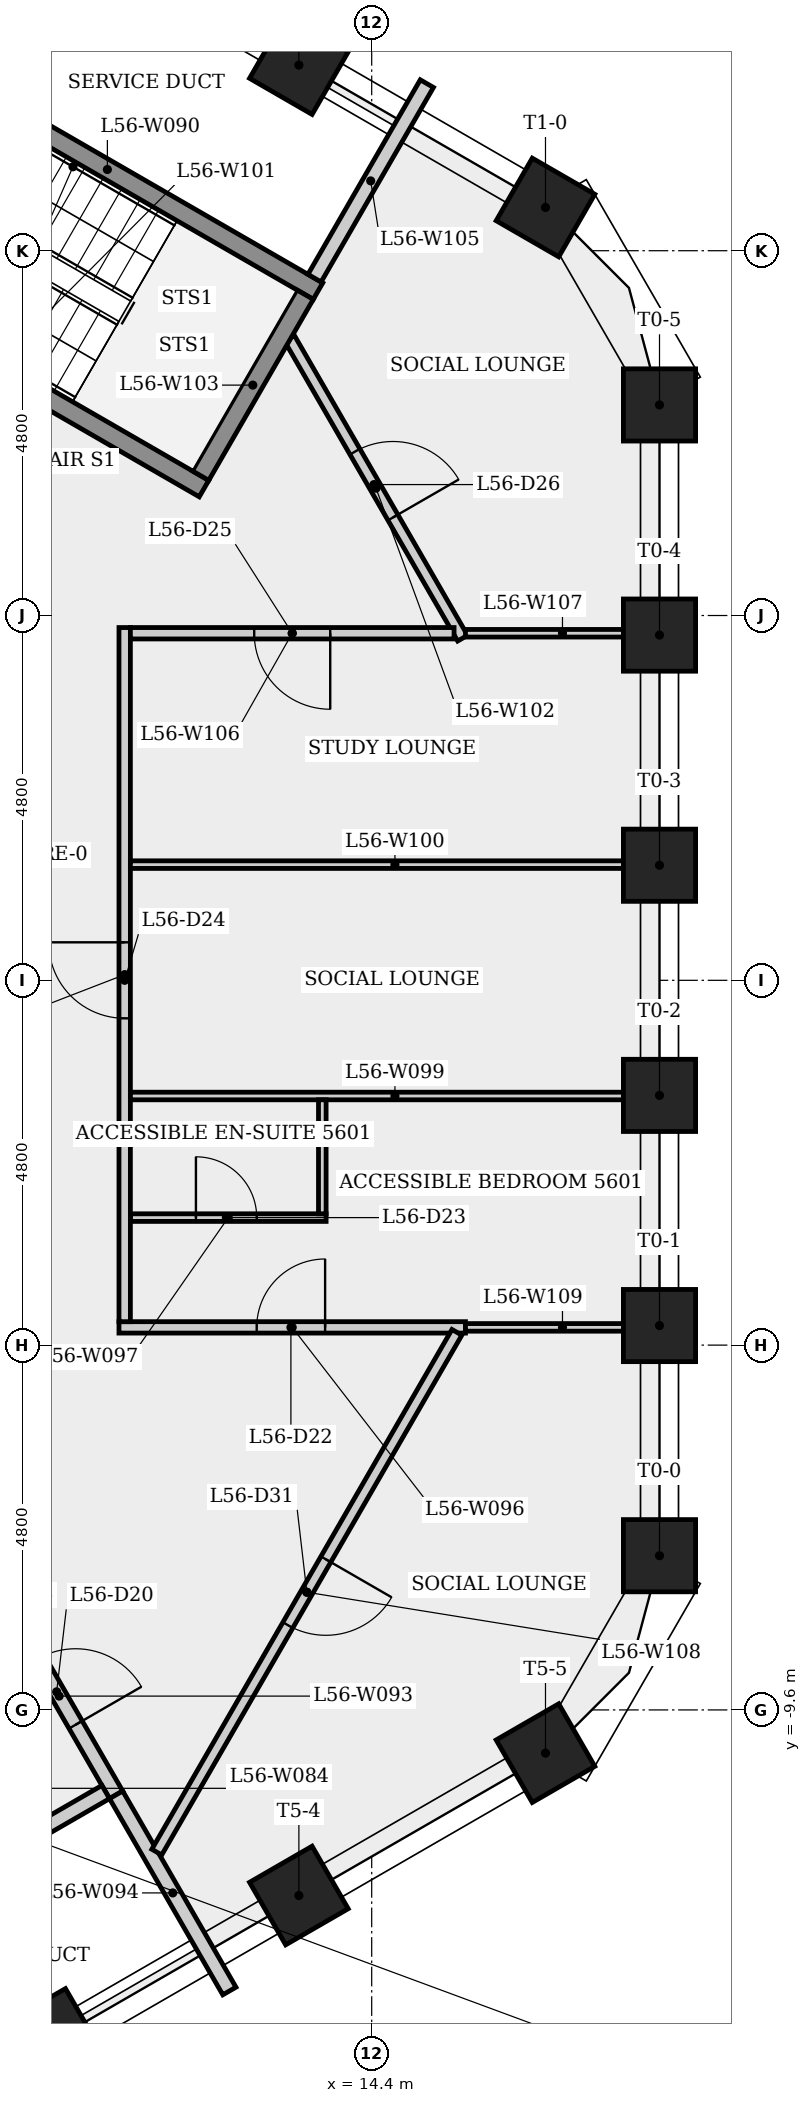
"""IFC4 building model, lengths in metres.
Left out: names, types, materials, properties, quantities, classifications, styles, units other than length and angle.
Written with IfcOpenShell. Run it as: python <this file> out.ifc"""

import sys

from ifc_helpers import new_model, si_unit, direction, frame, frame_2d, origin, origin_2d, place, context, subcontext, project, spatial, rectangle, extrude, element, fill, save


model = new_model("IFC4")
c1 = context("Model", 3, precision=1e-05, world=origin(), true_north=direction((0.0, 1.0)))
c2 = subcontext(c1, "Body", "Model", "MODEL_VIEW")
j1 = project(units=[si_unit("LENGTHUNIT", "METRE"), si_unit("PLANEANGLEUNIT", "RADIAN")], contexts=[c1])
p1 = place(None, origin())
s1 = spatial("IfcSite", under=j1, at=p1, CompositionType="ELEMENT")
p2 = place(p1, origin())
s2 = spatial("IfcBuilding", under=s1, at=p2, CompositionType="ELEMENT")
p3 = place(p2, frame((0.0, 0.0, 210.1)))
s3 = spatial("IfcBuildingStorey", under=s2, at=p3, CompositionType="ELEMENT", Elevation=210.1)
for number, where, z_axis, x_axis in (
    (1, (18.187, -7.571, 0.0), (0.0, 0.0, 1.0), (1.0, 0.0, 0.0)),
    (2, (18.187, -4.542, 0.0), (0.0, 0.0, 1.0), (1.0, 0.0, 0.0)),
    (3, (18.187, -1.514, 0.0), (0.0, 0.0, 1.0), (1.0, 0.0, 0.0)),
    (4, (18.187, 1.514, 0.0), (0.0, 0.0, 1.0), (1.0, 0.0, 0.0)),
    (5, (18.187, 4.542, 0.0), (0.0, 0.0, 1.0), (1.0, 0.0, 0.0)),
    (6, (18.187, 7.571, 0.0), (0.0, 0.0, 1.0), (1.0, 0.0, 0.0)),
    (7, (16.687, 10.169, 0.0), (0.0, 0.0, 1.0), (0.5, 0.866, 0.0)),
    (8, (13.442, 12.042, 0.0), (0.0, 0.0, 1.0), (0.5, 0.866, 0.0)),
    (9, (10.197, -13.916, 0.0), (0.0, 0.0, 1.0), (0.5, -0.866, 0.0)),
    (10, (13.442, -12.042, 0.0), (0.0, 0.0, 1.0), (0.5, -0.866, 0.0)),
    (11, (16.687, -10.169, 0.0), (0.0, 0.0, 1.0), (0.5, -0.866, 0.0)),
):
    element("IfcColumn", number, at=place(p3, frame(where, z_axis=z_axis, x_axis=x_axis)), inside=s3, PredefinedType="COLUMN", context=c2, shape_type="SweptSolid", body=[
        extrude(rectangle(XDim=0.95, YDim=0.95, at=origin_2d()), origin(), (0.0, 0.0, 1.0), 4.0),
    ])
p4 = place(p3, frame((8.151, 12.268, 0.0), z_axis=(0.0, 0.0, 1.0), x_axis=(0.866025499775, -0.499999833739, 0.0)))
e12 = element("IfcWall", 12, at=p4, inside=s3, PredefinedType="SHEAR", context=c2, shape_type="SweptSolid", body=[
    extrude(rectangle(XDim=6.4, YDim=0.25, at=frame_2d((3.2, 0.0))), origin(), (0.0, 0.0, 1.0), 3.6),
])
p5 = place(p3, frame((9.537, -8.119, 0.0), z_axis=(0.0, 0.0, 1.0), x_axis=(0.499990139034, -0.866031096941, 0.0)))
e13 = element("IfcWall", 13, at=p5, inside=s3, PredefinedType="PARTITIONING", context=c2, shape_type="SweptSolid", body=[
    extrude(rectangle(XDim=3.0, YDim=0.2, at=frame_2d((1.5, 0.0))), origin(), (0.0, 0.0, 1.0), 3.6),
])
p6 = place(p5, frame((0.935, 0.0, 0.0)))
e14 = element("IfcOpeningElement", 14, at=p6, cuts=e13, PredefinedType="OPENING", context=c2, shape_type="SweptSolid", body=[
    extrude(rectangle(XDim=1.0, YDim=2.1, at=frame_2d((0.5, 1.05))), frame((0.0, 0.11, 0.0), z_axis=(0.0, -1.0, 0.0), x_axis=(1.0, 0.0, 0.0)), (0.0, 0.0, 1.0), 0.22),
])
p7 = place(p3, frame((11.037, -10.717, 0.0), z_axis=(0.0, 0.0, 1.0), x_axis=(0.499980071345, -0.866036909293, 0.0)))
e15 = element("IfcWall", 15, at=p7, inside=s3, PredefinedType="PLUMBINGWALL", context=c2, shape_type="SweptSolid", body=[
    extrude(rectangle(XDim=2.98, YDim=0.2, at=frame_2d((1.49, 0.0))), origin(), (0.0, 0.0, 1.0), 3.6),
])
p8 = place(p3, frame((10.901, -10.681, 0.0), z_axis=(0.0, 0.0, 1.0), x_axis=(-0.866007538022, -0.500030943131, 0.0)))
e16 = element("IfcWall", 16, at=p8, inside=s3, PredefinedType="PLUMBINGWALL", context=c2, shape_type="SweptSolid", body=[
    extrude(rectangle(XDim=2.375, YDim=0.2, at=frame_2d((1.188, 0.0))), origin(), (0.0, 0.0, 1.0), 3.6),
])
p9 = place(p3, frame((11.075, -4.567, 0.0), z_axis=(0.0, 0.0, 1.0), x_axis=(1.0, 0.0, 0.0)))
e17 = element("IfcWall", 17, at=p9, inside=s3, PredefinedType="PARTITIONING", context=c2, shape_type="SweptSolid", body=[
    extrude(rectangle(XDim=4.559, YDim=0.15, at=frame_2d((2.279, 0.0))), origin(), (0.0, 0.0, 1.0), 3.6),
])
p10 = place(p9, frame((1.812, 0.0, 0.0)))
e18 = element("IfcOpeningElement", 18, at=p10, cuts=e17, PredefinedType="OPENING", context=c2, shape_type="SweptSolid", body=[
    extrude(rectangle(XDim=0.9, YDim=2.1, at=frame_2d((0.45, 1.05))), frame((0.0, 0.085, 0.0), z_axis=(0.0, -1.0, 0.0), x_axis=(1.0, 0.0, 0.0)), (0.0, 0.0, 1.0), 0.17),
])
p11 = place(p3, frame((11.225, -3.122, 0.0), z_axis=(0.0, 0.0, 1.0), x_axis=(1.0, 0.0, 0.0)))
e19 = element("IfcWall", 19, at=p11, inside=s3, PredefinedType="PARTITIONING", context=c2, shape_type="SweptSolid", body=[
    extrude(rectangle(XDim=2.575, YDim=0.1, at=frame_2d((1.288, 0.0))), origin(), (0.0, 0.0, 1.0), 3.6),
])
p12 = place(p11, frame((0.863, 0.0, 0.0)))
e20 = element("IfcOpeningElement", 20, at=p12, cuts=e19, PredefinedType="OPENING", context=c2, shape_type="SweptSolid", body=[
    extrude(rectangle(XDim=0.8, YDim=2.1, at=frame_2d((0.4, 1.05))), frame((0.0, 0.06, 0.0), z_axis=(0.0, -1.0, 0.0), x_axis=(1.0, 0.0, 0.0)), (0.0, 0.0, 1.0), 0.12),
])
p13 = place(p3, frame((11.15, -4.492, 0.0), z_axis=(0.0, 0.0, 1.0), x_axis=(0.0, 1.0, 0.0)))
e21 = element("IfcWall", 21, at=p13, inside=s3, PredefinedType="PARTITIONING", context=c2, shape_type="SweptSolid", body=[
    extrude(rectangle(XDim=9.133, YDim=0.15, at=frame_2d((4.567, 0.0))), origin(), (0.0, 0.0, 1.0), 3.6),
])
p14 = place(p13, frame((3.992, 0.0, 0.0)))
e22 = element("IfcOpeningElement", 22, at=p14, cuts=e21, PredefinedType="OPENING", context=c2, shape_type="SweptSolid", body=[
    extrude(rectangle(XDim=1.0, YDim=2.1, at=frame_2d((0.5, 1.05))), frame((0.0, 0.085, 0.0), z_axis=(0.0, -1.0, 0.0), x_axis=(1.0, 0.0, 0.0)), (0.0, 0.0, 1.0), 0.17),
])
for number, where, z_axis, x_axis in (
    (23, (11.225, -1.522, 0.0), (0.0, 0.0, 1.0), (1.0, 0.0, 0.0)),
    (24, (11.225, 1.522, 0.0), (0.0, 0.0, 1.0), (1.0, 0.0, 0.0)),
):
    element("IfcWall", number, at=place(p3, frame(where, z_axis=z_axis, x_axis=x_axis)), inside=s3, PredefinedType="PARTITIONING", context=c2, shape_type="SweptSolid", body=[
        extrude(rectangle(XDim=6.961, YDim=0.1, at=frame_2d((3.481, 0.0))), origin(), (0.0, 0.0, 1.0), 3.6),
    ])
p15 = place(p3, frame((12.194, 6.47, 0.0), z_axis=(0.0, 0.0, 1.0), x_axis=(-0.866025499775, 0.499999833739, 0.0)))
e25 = element("IfcWall", 25, at=p15, inside=s3, PredefinedType="SHEAR", context=c2, shape_type="SweptSolid", body=[
    extrude(rectangle(XDim=6.4, YDim=0.25, at=frame_2d((3.2, 0.0))), origin(), (0.0, 0.0, 1.0), 3.6),
])
p16 = place(p15, frame((5.25, 0.0, 0.0)))
e26 = element("IfcOpeningElement", 26, at=p16, cuts=e25, PredefinedType="OPENING", context=c2, shape_type="SweptSolid", body=[
    extrude(rectangle(XDim=1.0, YDim=2.1, at=frame_2d((0.5, 1.05))), frame((0.0, 0.135, 0.0), z_axis=(0.0, -1.0, 0.0), x_axis=(1.0, 0.0, 0.0)), (0.0, 0.0, 1.0), 0.27),
])
p17 = place(p3, frame((13.317, 8.449, 0.0), z_axis=(0.0, 0.0, 1.0), x_axis=(0.500033079325, -0.866006304585, 0.0)))
e27 = element("IfcWall", 27, at=p17, inside=s3, PredefinedType="PARTITIONING", context=c2, shape_type="SweptSolid", body=[
    extrude(rectangle(XDim=4.558, YDim=0.15, at=frame_2d((2.279, 0.0))), origin(), (0.0, 0.0, 1.0), 3.6),
])
p18 = place(p17, frame((1.724, 0.0, 0.0)))
e28 = element("IfcOpeningElement", 28, at=p18, cuts=e27, PredefinedType="OPENING", context=c2, shape_type="SweptSolid", body=[
    extrude(rectangle(XDim=1.0, YDim=2.1, at=frame_2d((0.5, 1.05))), frame((0.0, 0.085, 0.0), z_axis=(0.0, -1.0, 0.0), x_axis=(1.0, 0.0, 0.0)), (0.0, 0.0, 1.0), 0.17),
])
p19 = place(p3, frame((12.148, 6.641, 0.0), z_axis=(0.0, 0.0, 1.0), x_axis=(0.500034990121, 0.866005201286, 0.0)))
e29 = element("IfcWall", 29, at=p19, inside=s3, PredefinedType="SHEAR", context=c2, shape_type="SweptSolid", body=[
    extrude(rectangle(XDim=2.75, YDim=0.25, at=frame_2d((1.375, 0.0))), origin(), (0.0, 0.0, 1.0), 3.6),
])
p20 = place(p3, frame((13.75, -3.072, 0.0), z_axis=(0.0, 0.0, 1.0), x_axis=(0.0, 1.0, 0.0)))
e30 = element("IfcWall", 30, at=p20, inside=s3, PredefinedType="PARTITIONING", context=c2, shape_type="SweptSolid", body=[
    extrude(rectangle(XDim=1.5, YDim=0.1, at=frame_2d((0.75, 0.0))), origin(), (0.0, 0.0, 1.0), 3.6),
])
p21 = place(p3, frame((15.126, 11.799, 0.0), z_axis=(0.0, 0.0, 1.0), x_axis=(-0.499967936676, -0.866043914762, 0.0)))
e31 = element("IfcWall", 31, at=p21, inside=s3, PredefinedType="PLUMBINGWALL", context=c2, shape_type="SweptSolid", body=[
    extrude(rectangle(XDim=2.956, YDim=0.2, at=frame_2d((1.478, 0.0))), origin(), (0.0, 0.0, 1.0), 3.6),
])
p22 = place(p3, frame((15.484, 4.567, 0.0), z_axis=(0.0, 0.0, 1.0), x_axis=(-1.0, 0.0, 0.0)))
e32 = element("IfcWall", 32, at=p22, inside=s3, PredefinedType="PARTITIONING", context=c2, shape_type="SweptSolid", body=[
    extrude(rectangle(XDim=4.259, YDim=0.15, at=frame_2d((2.129, 0.0))), origin(), (0.0, 0.0, 1.0), 3.6),
])
p23 = place(p22, frame((1.629, 0.0, 0.0)))
e33 = element("IfcOpeningElement", 33, at=p23, cuts=e32, PredefinedType="OPENING", context=c2, shape_type="SweptSolid", body=[
    extrude(rectangle(XDim=1.0, YDim=2.1, at=frame_2d((0.5, 1.05))), frame((0.0, 0.085, 0.0), z_axis=(0.0, -1.0, 0.0), x_axis=(1.0, 0.0, 0.0)), (0.0, 0.0, 1.0), 0.17),
])
p24 = place(p3, frame((15.634, 4.567, 0.0), z_axis=(0.0, 0.0, 1.0), x_axis=(1.0, 0.0, 0.0)))
e34 = element("IfcWall", 34, at=p24, inside=s3, PredefinedType="PARTITIONING", context=c2, shape_type="SweptSolid", body=[
    extrude(rectangle(XDim=2.553, YDim=0.1, at=frame_2d((1.276, 0.0))), origin(), (0.0, 0.0, 1.0), 3.6),
])
p25 = place(p3, frame((15.521, -4.632, 0.0), z_axis=(0.0, 0.0, 1.0), x_axis=(-0.499992740516, -0.866029595009, 0.0)))
e35 = element("IfcWall", 35, at=p25, inside=s3, PredefinedType="PARTITIONING", context=c2, shape_type="SweptSolid", body=[
    extrude(rectangle(XDim=7.897, YDim=0.15, at=frame_2d((3.948, 0.0))), origin(), (0.0, 0.0, 1.0), 3.6),
])
p26 = place(p25, frame((3.449, 0.0, 0.0)))
e36 = element("IfcOpeningElement", 36, at=p26, cuts=e35, PredefinedType="OPENING", context=c2, shape_type="SweptSolid", body=[
    extrude(rectangle(XDim=1.0, YDim=2.1, at=frame_2d((0.5, 1.05))), frame((0.0, 0.085, 0.0), z_axis=(0.0, -1.0, 0.0), x_axis=(1.0, 0.0, 0.0)), (0.0, 0.0, 1.0), 0.17),
])
p27 = place(p3, frame((18.187, -4.567, 0.0), z_axis=(0.0, 0.0, 1.0), x_axis=(-1.0, 0.0, 0.0)))
e37 = element("IfcWall", 37, at=p27, inside=s3, PredefinedType="PARTITIONING", context=c2, shape_type="SweptSolid", body=[
    extrude(rectangle(XDim=2.553, YDim=0.1, at=frame_2d((1.276, 0.0))), origin(), (0.0, 0.0, 1.0), 3.6),
])
p28 = place(p6, origin())
e38 = element("IfcDoor", 38, at=p28, inside=s3, OperationType="SINGLE_SWING_RIGHT", PredefinedType="DOOR", context=c2, shape_type="SweptSolid", body=[
    extrude(rectangle(XDim=1.0, YDim=2.1, at=frame_2d((0.5, 1.05))), frame((0.0, 0.025, 0.0), z_axis=(0.0, -1.0, 0.0), x_axis=(1.0, 0.0, 0.0)), (0.0, 0.0, 1.0), 0.05),
])
fill(e14, e38)
p29 = place(p10, origin())
e39 = element("IfcDoor", 39, at=p29, inside=s3, OperationType="SINGLE_SWING_RIGHT", PredefinedType="DOOR", context=c2, shape_type="SweptSolid", body=[
    extrude(rectangle(XDim=0.9, YDim=2.1, at=frame_2d((0.45, 1.05))), frame((0.0, 0.025, 0.0), z_axis=(0.0, -1.0, 0.0), x_axis=(1.0, 0.0, 0.0)), (0.0, 0.0, 1.0), 0.05),
])
fill(e18, e39)
p30 = place(p12, origin())
e40 = element("IfcDoor", 40, at=p30, inside=s3, OperationType="SINGLE_SWING_LEFT", PredefinedType="DOOR", context=c2, shape_type="SweptSolid", body=[
    extrude(rectangle(XDim=0.8, YDim=2.1, at=frame_2d((0.4, 1.05))), frame((0.0, 0.025, 0.0), z_axis=(0.0, -1.0, 0.0), x_axis=(1.0, 0.0, 0.0)), (0.0, 0.0, 1.0), 0.05),
])
fill(e20, e40)
p31 = place(p14, origin())
e41 = element("IfcDoor", 41, at=p31, inside=s3, OperationType="SINGLE_SWING_RIGHT", PredefinedType="DOOR", context=c2, shape_type="SweptSolid", body=[
    extrude(rectangle(XDim=1.0, YDim=2.1, at=frame_2d((0.5, 1.05))), frame((0.0, 0.025, 0.0), z_axis=(0.0, -1.0, 0.0), x_axis=(1.0, 0.0, 0.0)), (0.0, 0.0, 1.0), 0.05),
])
fill(e22, e41)
p32 = place(p23, origin())
e42 = element("IfcDoor", 42, at=p32, inside=s3, OperationType="SINGLE_SWING_LEFT", PredefinedType="DOOR", context=c2, shape_type="SweptSolid", body=[
    extrude(rectangle(XDim=1.0, YDim=2.1, at=frame_2d((0.5, 1.05))), frame((0.0, 0.025, 0.0), z_axis=(0.0, -1.0, 0.0), x_axis=(1.0, 0.0, 0.0)), (0.0, 0.0, 1.0), 0.05),
])
fill(e33, e42)
p33 = place(p18, origin())
e43 = element("IfcDoor", 43, at=p33, inside=s3, OperationType="SINGLE_SWING_RIGHT", PredefinedType="DOOR", context=c2, shape_type="SweptSolid", body=[
    extrude(rectangle(XDim=1.0, YDim=2.1, at=frame_2d((0.5, 1.05))), frame((0.0, 0.025, 0.0), z_axis=(0.0, -1.0, 0.0), x_axis=(1.0, 0.0, 0.0)), (0.0, 0.0, 1.0), 0.05),
])
fill(e28, e43)
p34 = place(p26, origin())
e44 = element("IfcDoor", 44, at=p34, inside=s3, OperationType="SINGLE_SWING_LEFT", PredefinedType="DOOR", context=c2, shape_type="SweptSolid", body=[
    extrude(rectangle(XDim=1.0, YDim=2.1, at=frame_2d((0.5, 1.05))), frame((0.0, 0.025, 0.0), z_axis=(0.0, -1.0, 0.0), x_axis=(1.0, 0.0, 0.0)), (0.0, 0.0, 1.0), 0.05),
])
fill(e36, e44)
save(model, sys.argv[1])
